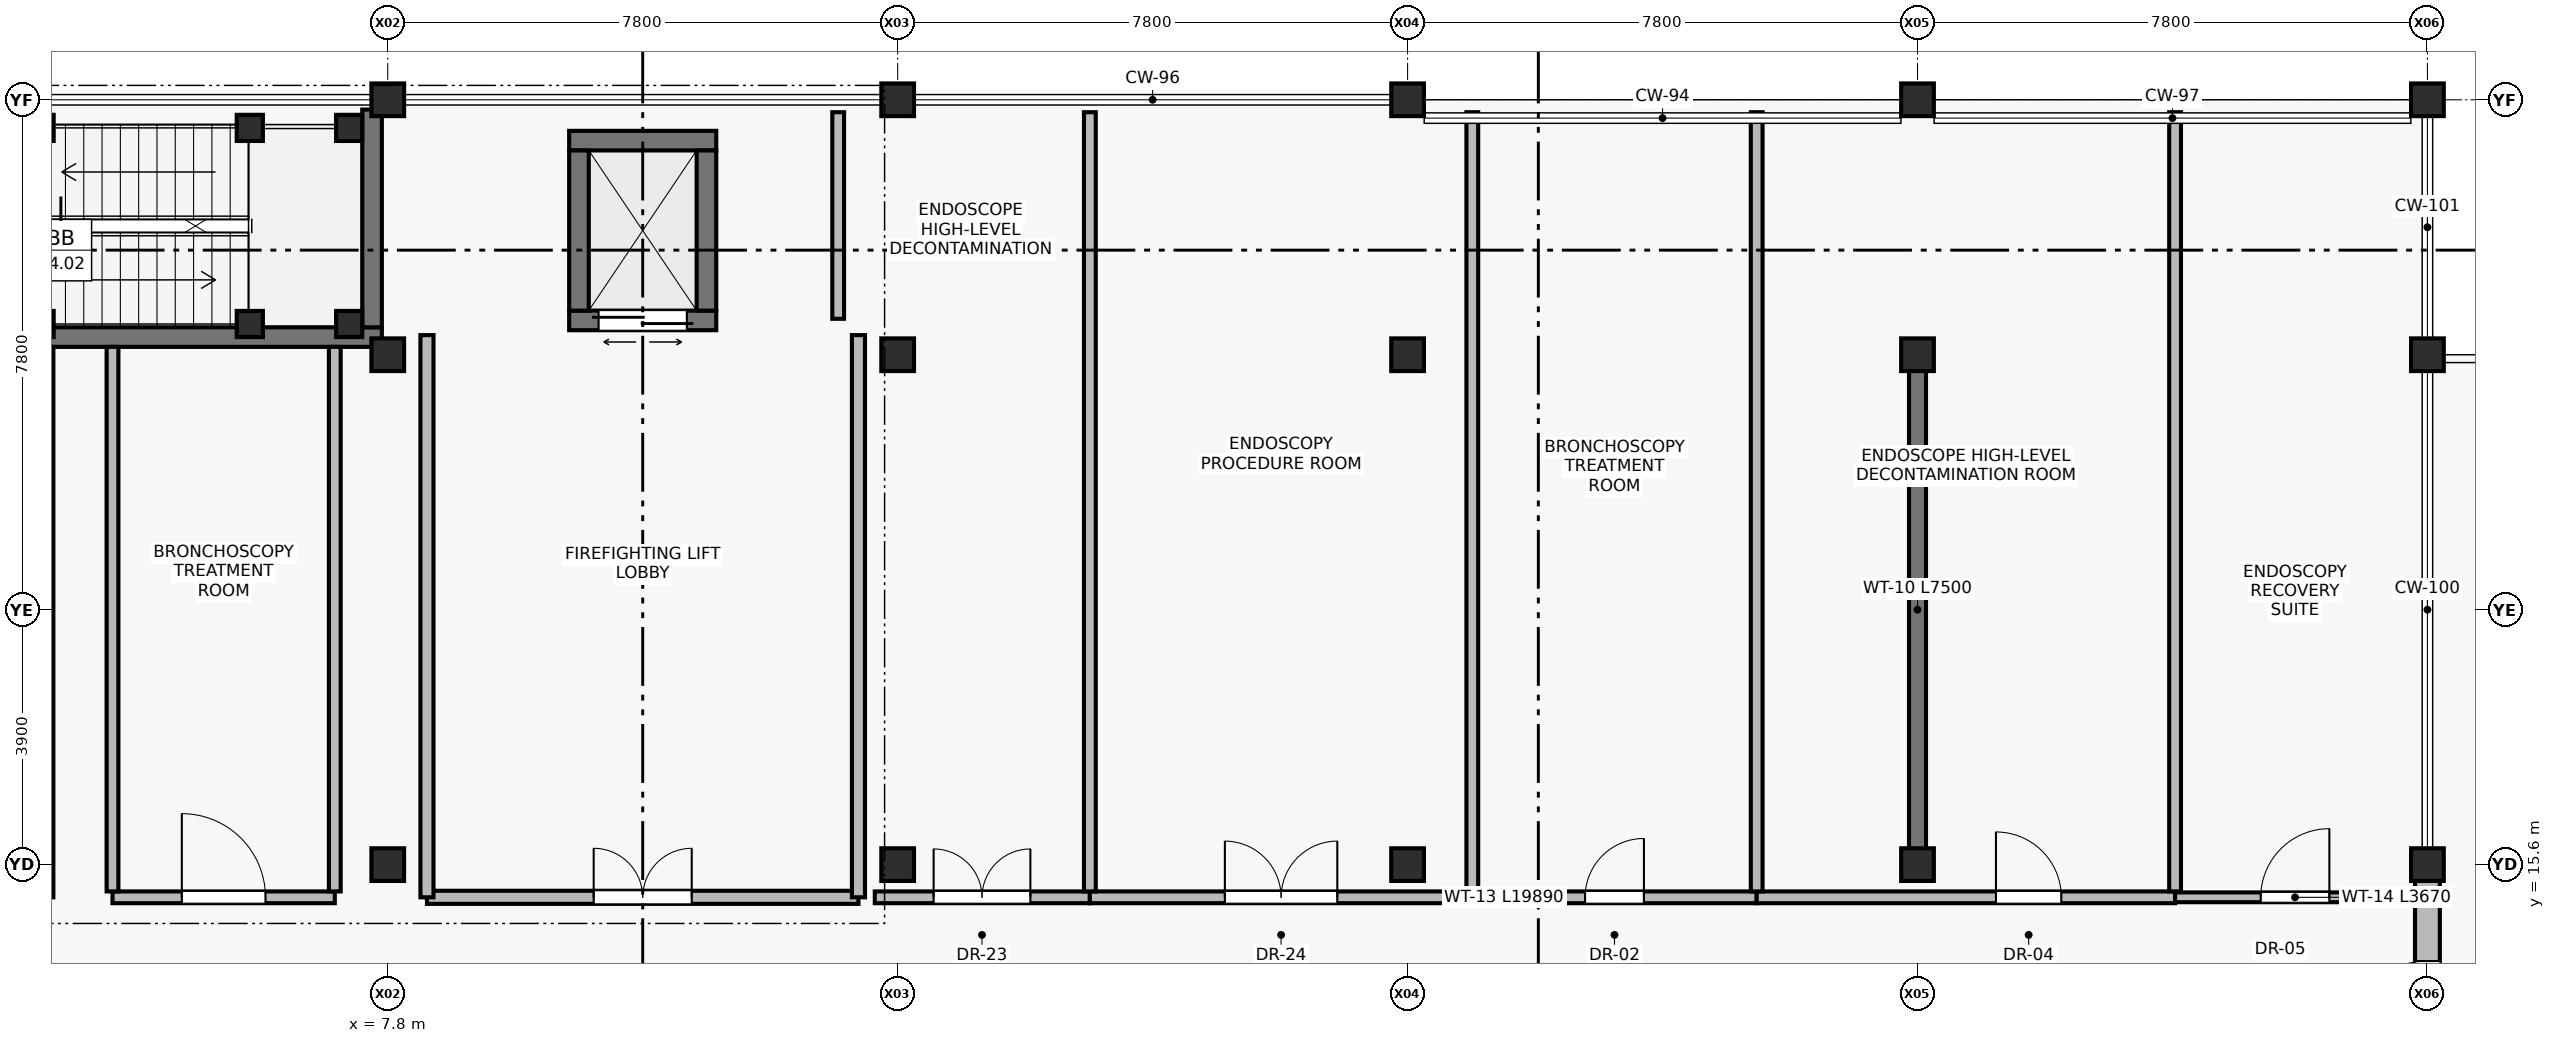
"""IFC4 building model, lengths in metres.
Left out: names, types, materials, properties, quantities, classifications, styles, units other than length and angle.
Written with IfcOpenShell. Run it as: python <this file> out.ifc"""

import sys

from ifc_helpers import new_model, si_unit, direction, frame, frame_2d, origin, origin_2d, place, context, subcontext, project, spatial, rectangle, extrude, element, fill, save


model = new_model("IFC4")
c1 = context("Model", 3, precision=1e-05, world=origin(), true_north=direction((0.0, 1.0)))
c2 = subcontext(c1, "Body", "Model", "MODEL_VIEW")
j1 = project(units=[si_unit("LENGTHUNIT", "METRE"), si_unit("PLANEANGLEUNIT", "RADIAN")], contexts=[c1])
p1 = place(None, origin())
s1 = spatial("IfcSite", under=j1, at=p1, CompositionType="ELEMENT")
p2 = place(p1, origin())
s2 = spatial("IfcBuilding", under=s1, at=p2, CompositionType="ELEMENT")
p3 = place(p2, frame((0.0, 0.0, 14.1)))
s3 = spatial("IfcBuildingStorey", under=s2, at=p3, CompositionType="ELEMENT", Elevation=14.1)
for number, where, z_axis, x_axis in (
    (1, (7.8, 15.6, 0.0), (0.0, 0.0, 1.0), (1.0, 0.0, 0.0)),
    (2, (7.8, 23.4, 0.0), (0.0, 0.0, 1.0), (1.0, 0.0, 0.0)),
    (3, (7.8, 27.3, 0.0), (0.0, 0.0, 1.0), (1.0, 0.0, 0.0)),
    (4, (15.6, 15.6, 0.0), (0.0, 0.0, 1.0), (1.0, 0.0, 0.0)),
    (5, (15.6, 23.4, 0.0), (0.0, 0.0, 1.0), (1.0, 0.0, 0.0)),
    (6, (15.6, 27.3, 0.0), (0.0, 0.0, 1.0), (1.0, 0.0, 0.0)),
    (7, (23.4, 15.6, 0.0), (0.0, 0.0, 1.0), (1.0, 0.0, 0.0)),
    (8, (23.4, 23.4, 0.0), (0.0, 0.0, 1.0), (1.0, 0.0, 0.0)),
    (9, (23.4, 27.3, 0.0), (0.0, 0.0, 1.0), (1.0, 0.0, 0.0)),
    (10, (31.2, 15.6, 0.0), (0.0, 0.0, 1.0), (1.0, 0.0, 0.0)),
    (11, (31.2, 23.4, 0.0), (0.0, 0.0, 1.0), (1.0, 0.0, 0.0)),
    (12, (31.2, 27.3, 0.0), (0.0, 0.0, 1.0), (1.0, 0.0, 0.0)),
    (13, (39.0, 15.6, 0.0), (0.0, 0.0, 1.0), (1.0, 0.0, 0.0)),
    (14, (39.0, 23.4, 0.0), (0.0, 0.0, 1.0), (1.0, 0.0, 0.0)),
    (15, (39.0, 27.3, 0.0), (0.0, 0.0, 1.0), (1.0, 0.0, 0.0)),
):
    element("IfcColumn", number, at=place(p3, frame(where, z_axis=z_axis, x_axis=x_axis)), inside=s3, PredefinedType="COLUMN", context=c2, shape_type="SweptSolid", body=[
        extrude(rectangle(XDim=0.5, YDim=0.5, at=origin_2d()), origin(), (0.0, 0.0, 1.0), 4.5),
    ])
for number, where, z_axis, x_axis in (
    (16, (2.49, 23.87, 0.0), (0.0, 0.0, 1.0), (1.0, 0.0, 0.0)),
    (17, (2.49, 26.87, 0.0), (0.0, 0.0, 1.0), (1.0, 0.0, 0.0)),
    (18, (5.69, 23.87, 0.0), (0.0, 0.0, 1.0), (1.0, 0.0, 0.0)),
    (19, (5.69, 26.87, 0.0), (0.0, 0.0, 1.0), (1.0, 0.0, 0.0)),
    (20, (7.21, 23.87, 0.0), (0.0, 0.0, 1.0), (1.0, 0.0, 0.0)),
    (21, (7.21, 26.87, 0.0), (0.0, 0.0, 1.0), (1.0, 0.0, 0.0)),
):
    element("IfcColumn", number, at=place(p3, frame(where, z_axis=z_axis, x_axis=x_axis)), inside=s3, PredefinedType="COLUMN", context=c2, shape_type="SweptSolid", body=[
        extrude(rectangle(XDim=0.4, YDim=0.4, at=origin_2d()), origin(), (0.0, 0.0, 1.0), 4.5),
    ])
p4 = place(p3, frame((39.0, 15.35, 0.0), z_axis=(0.0, 0.0, 1.0), x_axis=(0.0, -1.0, 0.0)))
e22 = element("IfcWall", 22, at=p4, inside=s3, PredefinedType="STANDARD", context=c2, shape_type="SweptSolid", body=[
    extrude(rectangle(XDim=7.3, YDim=0.38, at=frame_2d((3.65, 0.0))), origin(), (0.0, 0.0, 1.0), 3.84),
])
p5 = place(p4, frame((1.225, 0.0, 0.0)))
e23 = element("IfcOpeningElement", 23, at=p5, cuts=e22, PredefinedType="OPENING", context=c2, shape_type="SweptSolid", body=[
    extrude(rectangle(XDim=1.25, YDim=2.2, at=frame_2d((0.625, 1.1))), frame((0.0, 0.2, 0.0), z_axis=(0.0, -1.0, 0.0), x_axis=(1.0, 0.0, 0.0)), (0.0, 0.0, 1.0), 0.4),
])
p6 = place(p3, frame((0.15, 23.67, 0.0), z_axis=(0.0, 0.0, 1.0), x_axis=(1.0, 0.0, 0.0)))
e24 = element("IfcWall", 24, at=p6, inside=s3, PredefinedType="SHEAR", context=c2, shape_type="SweptSolid", body=[
    extrude(rectangle(XDim=7.56, YDim=0.3, at=frame_2d((3.78, 0.0))), origin(), (0.0, 0.0, 1.0), 4.26),
])
p7 = place(p6, frame((0.56, 0.0, 0.0)))
e25 = element("IfcOpeningElement", 25, at=p7, cuts=e24, PredefinedType="OPENING", context=c2, shape_type="SweptSolid", body=[
    extrude(rectangle(XDim=1.4, YDim=2.2, at=frame_2d((0.7, 1.1))), frame((0.0, 0.16, 0.0), z_axis=(0.0, -1.0, 0.0), x_axis=(1.0, 0.0, 0.0)), (0.0, 0.0, 1.0), 0.32),
])
p8 = place(p3, frame((7.56, 23.82, 0.0), z_axis=(0.0, 0.0, 1.0), x_axis=(0.0, 1.0, 0.0)))
e26 = element("IfcWall", 26, at=p8, inside=s3, PredefinedType="SHEAR", context=c2, shape_type="SweptSolid", body=[
    extrude(rectangle(XDim=3.33, YDim=0.3, at=frame_2d((1.665, 0.0))), origin(), (0.0, 0.0, 1.0), 4.26),
])
p9 = place(p3, frame((10.575, 23.925, 0.0), z_axis=(0.0, 0.0, 1.0), x_axis=(1.0, 0.0, 0.0)))
e27 = element("IfcWall", 27, at=p9, inside=s3, PredefinedType="SHEAR", context=c2, shape_type="SweptSolid", body=[
    extrude(rectangle(XDim=2.25, YDim=0.3, at=frame_2d((1.125, 0.0))), origin(), (0.0, 0.0, 1.0), 4.26),
])
p10 = place(p9, frame((0.45, 0.0, 0.0)))
e28 = element("IfcOpeningElement", 28, at=p10, cuts=e27, PredefinedType="OPENING", context=c2, shape_type="SweptSolid", body=[
    extrude(rectangle(XDim=1.35, YDim=2.3, at=frame_2d((0.675, 1.15))), frame((0.0, 0.16, 0.0), z_axis=(0.0, -1.0, 0.0), x_axis=(1.0, 0.0, 0.0)), (0.0, 0.0, 1.0), 0.32),
])
p11 = place(p3, frame((12.825, 26.675, 0.0), z_axis=(0.0, 0.0, 1.0), x_axis=(-1.0, 0.0, 0.0)))
e29 = element("IfcWall", 29, at=p11, inside=s3, PredefinedType="SHEAR", context=c2, shape_type="SweptSolid", body=[
    extrude(rectangle(XDim=2.25, YDim=0.3, at=frame_2d((1.125, 0.0))), origin(), (0.0, 0.0, 1.0), 4.26),
])
for number, where, z_axis, x_axis in (
    (30, (10.725, 26.525, 0.0), (0.0, 0.0, 1.0), (0.0, -1.0, 0.0)),
    (31, (12.675, 24.075, 0.0), (0.0, 0.0, 1.0), (0.0, 1.0, 0.0)),
):
    element("IfcWall", number, at=place(p3, frame(where, z_axis=z_axis, x_axis=x_axis)), inside=s3, PredefinedType="SHEAR", context=c2, shape_type="SweptSolid", body=[
        extrude(rectangle(XDim=2.45, YDim=0.3, at=frame_2d((1.225, 0.0))), origin(), (0.0, 0.0, 1.0), 4.26),
    ])
p12 = place(p3, frame((8.4, 15.1, 0.0), z_axis=(0.0, 0.0, 1.0), x_axis=(1.0, 0.0, 0.0)))
e32 = element("IfcWall", 32, at=p12, inside=s3, PredefinedType="SOLIDWALL", context=c2, shape_type="SweptSolid", body=[
    extrude(rectangle(XDim=6.6, YDim=0.2, at=frame_2d((3.3, 0.0))), origin(), (0.0, 0.0, 1.0), 4.26),
])
p13 = place(p12, frame((2.55, 0.0, 0.0)))
e33 = element("IfcOpeningElement", 33, at=p13, cuts=e32, PredefinedType="OPENING", context=c2, shape_type="SweptSolid", body=[
    extrude(rectangle(XDim=1.5, YDim=2.2, at=frame_2d((0.75, 1.1))), frame((0.0, 0.11, 0.0), z_axis=(0.0, -1.0, 0.0), x_axis=(1.0, 0.0, 0.0)), (0.0, 0.0, 1.0), 0.22),
])
for number, where, z_axis, x_axis in (
    (34, (8.4, 23.7, 0.0), (0.0, 0.0, 1.0), (0.0, -1.0, 0.0)),
    (35, (15.0, 15.1, 0.0), (0.0, 0.0, 1.0), (0.0, 1.0, 0.0)),
):
    element("IfcWall", number, at=place(p3, frame(where, z_axis=z_axis, x_axis=x_axis)), inside=s3, PredefinedType="SOLIDWALL", context=c2, shape_type="SweptSolid", body=[
        extrude(rectangle(XDim=8.6, YDim=0.2, at=frame_2d((4.3, 0.0))), origin(), (0.0, 0.0, 1.0), 4.26),
    ])
p14 = place(p3, frame((31.2, 15.75, 0.0), z_axis=(0.0, 0.0, 1.0), x_axis=(0.0, 1.0, 0.0)))
e36 = element("IfcWall", 36, at=p14, inside=s3, PredefinedType="SHEAR", context=c2, shape_type="SweptSolid", body=[
    extrude(rectangle(XDim=7.5, YDim=0.26, at=frame_2d((3.75, 0.0))), origin(), (0.0, 0.0, 1.0), 4.26),
])
p15 = place(p3, frame((2.61, 15.1, 0.0), z_axis=(0.0, 0.0, 1.0), x_axis=(0.0, 1.0, 0.0)))
e37 = element("IfcWall", 37, at=p15, inside=s3, PredefinedType="PARTITIONING", context=c2, shape_type="SweptSolid", body=[
    extrude(rectangle(XDim=8.42, YDim=0.15, at=frame_2d((4.21, 0.0))), origin(), (0.0, 0.0, 1.0), 3.95),
])
p16 = place(p3, frame((3.59, 15.1, 0.0), z_axis=(0.0, 0.0, 1.0), x_axis=(1.0, 0.0, 0.0)))
e38 = element("IfcWall", 38, at=p16, inside=s3, PredefinedType="PARTITIONING", context=c2, shape_type="SweptSolid", body=[
    extrude(rectangle(XDim=3.4, YDim=0.18, at=frame_2d((1.7, 0.0))), origin(), (0.0, 0.0, 1.0), 4.26),
])
p17 = place(p16, frame((1.06, 0.0, 0.0)))
e39 = element("IfcOpeningElement", 39, at=p17, cuts=e38, PredefinedType="OPENING", context=c2, shape_type="SweptSolid", body=[
    extrude(rectangle(XDim=1.28, YDim=2.25, at=frame_2d((0.64, 1.125))), frame((0.0, 0.1, 0.0), z_axis=(0.0, -1.0, 0.0), x_axis=(1.0, 0.0, 0.0)), (0.0, 0.0, 1.0), 0.2),
])
p18 = place(p3, frame((15.25, 15.1, 0.0), z_axis=(0.0, 0.0, 1.0), x_axis=(1.0, 0.0, 0.0)))
e40 = element("IfcWall", 40, at=p18, inside=s3, PredefinedType="PARTITIONING", context=c2, shape_type="SweptSolid", body=[
    extrude(rectangle(XDim=3.29, YDim=0.18, at=frame_2d((1.645, 0.0))), origin(), (0.0, 0.0, 1.0), 4.26),
])
p19 = place(p18, frame((0.9, 0.0, 0.0)))
e41 = element("IfcOpeningElement", 41, at=p19, cuts=e40, PredefinedType="OPENING", context=c2, shape_type="SweptSolid", body=[
    extrude(rectangle(XDim=1.48, YDim=2.25, at=frame_2d((0.74, 1.125))), frame((0.0, 0.1, 0.0), z_axis=(0.0, -1.0, 0.0), x_axis=(1.0, 0.0, 0.0)), (0.0, 0.0, 1.0), 0.2),
])
p20 = place(p3, frame((18.54, 15.1, 0.0), z_axis=(0.0, 0.0, 1.0), x_axis=(1.0, 0.0, 0.0)))
e42 = element("IfcWall", 42, at=p20, inside=s3, PredefinedType="PARTITIONING", context=c2, shape_type="SweptSolid", body=[
    extrude(rectangle(XDim=5.85, YDim=0.18, at=frame_2d((2.925, 0.0))), origin(), (0.0, 0.0, 1.0), 4.26),
])
p21 = place(p20, frame((2.065, 0.0, 0.0)))
e43 = element("IfcOpeningElement", 43, at=p21, cuts=e42, PredefinedType="OPENING", context=c2, shape_type="SweptSolid", body=[
    extrude(rectangle(XDim=1.72, YDim=2.3, at=frame_2d((0.86, 1.15))), frame((0.0, 0.1, 0.0), z_axis=(0.0, -1.0, 0.0), x_axis=(1.0, 0.0, 0.0)), (0.0, 0.0, 1.0), 0.2),
])
p22 = place(p3, frame((24.39, 15.1, 0.0), z_axis=(0.0, 0.0, 1.0), x_axis=(1.0, 0.0, 0.0)))
e44 = element("IfcWall", 44, at=p22, inside=s3, PredefinedType="PARTITIONING", context=c2, shape_type="SweptSolid", body=[
    extrude(rectangle(XDim=4.35, YDim=0.18, at=frame_2d((2.175, 0.0))), origin(), (0.0, 0.0, 1.0), 4.26),
])
p23 = place(p22, frame((1.725, 0.0, 0.0)))
e45 = element("IfcOpeningElement", 45, at=p23, cuts=e44, PredefinedType="OPENING", context=c2, shape_type="SweptSolid", body=[
    extrude(rectangle(XDim=0.9, YDim=2.1, at=frame_2d((0.45, 1.05))), frame((0.0, 0.1, 0.0), z_axis=(0.0, -1.0, 0.0), x_axis=(1.0, 0.0, 0.0)), (0.0, 0.0, 1.0), 0.2),
])
p24 = place(p3, frame((28.74, 15.1, 0.0), z_axis=(0.0, 0.0, 1.0), x_axis=(1.0, 0.0, 0.0)))
e46 = element("IfcWall", 46, at=p24, inside=s3, PredefinedType="PARTITIONING", context=c2, shape_type="SweptSolid", body=[
    extrude(rectangle(XDim=6.4, YDim=0.18, at=frame_2d((3.2, 0.0))), origin(), (0.0, 0.0, 1.0), 4.26),
])
p25 = place(p24, frame((3.66, 0.0, 0.0)))
e47 = element("IfcOpeningElement", 47, at=p25, cuts=e46, PredefinedType="OPENING", context=c2, shape_type="SweptSolid", body=[
    extrude(rectangle(XDim=1.0, YDim=2.1, at=frame_2d((0.5, 1.05))), frame((0.0, 0.1, 0.0), z_axis=(0.0, -1.0, 0.0), x_axis=(1.0, 0.0, 0.0)), (0.0, 0.0, 1.0), 0.2),
])
p26 = place(p3, frame((35.14, 15.1, 0.0), z_axis=(0.0, 0.0, 1.0), x_axis=(1.0, 0.0, 0.0)))
e48 = element("IfcWall", 48, at=p26, inside=s3, PredefinedType="PARTITIONING", context=c2, shape_type="SweptSolid", body=[
    extrude(rectangle(XDim=3.67, YDim=0.15, at=frame_2d((1.835, 0.0))), origin(), (0.0, 0.0, 1.0), 4.26),
])
p27 = place(p26, frame((1.31, 0.0, 0.0)))
e49 = element("IfcOpeningElement", 49, at=p27, cuts=e48, PredefinedType="OPENING", context=c2, shape_type="SweptSolid", body=[
    extrude(rectangle(XDim=1.05, YDim=2.15, at=frame_2d((0.525, 1.075))), frame((0.0, 0.085, 0.0), z_axis=(0.0, -1.0, 0.0), x_axis=(1.0, 0.0, 0.0)), (0.0, 0.0, 1.0), 0.17),
])
for number, where, z_axis, x_axis in (
    (50, (3.59, 15.19, 0.0), (0.0, 0.0, 1.0), (0.0, 1.0, 0.0)),
    (51, (6.99, 15.19, 0.0), (0.0, 0.0, 1.0), (0.0, 1.0, 0.0)),
):
    element("IfcWall", number, at=place(p3, frame(where, z_axis=z_axis, x_axis=x_axis)), inside=s3, PredefinedType="PARTITIONING", context=c2, shape_type="SweptSolid", body=[
        extrude(rectangle(XDim=8.33, YDim=0.18, at=frame_2d((4.165, 0.0))), origin(), (0.0, 0.0, 1.0), 4.26),
    ])
p28 = place(p3, frame((14.69, 23.95, 0.0), z_axis=(0.0, 0.0, 1.0), x_axis=(0.0, 1.0, 0.0)))
e52 = element("IfcWall", 52, at=p28, inside=s3, PredefinedType="PARTITIONING", context=c2, shape_type="SweptSolid", body=[
    extrude(rectangle(XDim=3.16, YDim=0.18, at=frame_2d((1.58, 0.0))), origin(), (0.0, 0.0, 1.0), 4.26),
])
p29 = place(p3, frame((18.54, 15.19, 0.0), z_axis=(0.0, 0.0, 1.0), x_axis=(0.0, 1.0, 0.0)))
e53 = element("IfcWall", 53, at=p29, inside=s3, PredefinedType="PARTITIONING", context=c2, shape_type="SweptSolid", body=[
    extrude(rectangle(XDim=11.92, YDim=0.18, at=frame_2d((5.96, 0.0))), origin(), (0.0, 0.0, 1.0), 3.95),
])
p30 = place(p3, frame((24.39, 15.19, 0.0), z_axis=(0.0, 0.0, 1.0), x_axis=(0.0, 1.0, 0.0)))
e54 = element("IfcWall", 54, at=p30, inside=s3, PredefinedType="PARTITIONING", context=c2, shape_type="SweptSolid", body=[
    extrude(rectangle(XDim=11.92, YDim=0.18, at=frame_2d((5.96, 0.0))), origin(), (0.0, 0.0, 1.0), 4.26),
])
p31 = place(p3, frame((28.74, 15.19, 0.0), z_axis=(0.0, 0.0, 1.0), x_axis=(0.0, 1.0, 0.0)))
e55 = element("IfcWall", 55, at=p31, inside=s3, PredefinedType="PARTITIONING", context=c2, shape_type="SweptSolid", body=[
    extrude(rectangle(XDim=11.92, YDim=0.18, at=frame_2d((5.96, 0.0))), origin(), (0.0, 0.0, 1.0), 3.95),
])
p32 = place(p3, frame((35.14, 15.19, 0.0), z_axis=(0.0, 0.0, 1.0), x_axis=(0.0, 1.0, 0.0)))
e56 = element("IfcWall", 56, at=p32, inside=s3, PredefinedType="PARTITIONING", context=c2, shape_type="SweptSolid", body=[
    extrude(rectangle(XDim=11.92, YDim=0.18, at=frame_2d((5.96, 0.0))), origin(), (0.0, 0.0, 1.0), 4.26),
])
p33 = place(p5, frame((1.25, 0.0, 0.0), z_axis=(0.0, 0.0, 1.0), x_axis=(-1.0, 0.0, 0.0)))
e57 = element("IfcDoor", 57, at=p33, inside=s3, OperationType="SINGLE_SWING_RIGHT", PredefinedType="DOOR", context=c2, shape_type="SweptSolid", body=[
    extrude(rectangle(XDim=1.25, YDim=2.2, at=frame_2d((0.625, 1.1))), frame((0.0, 0.025, 0.0), z_axis=(0.0, -1.0, 0.0), x_axis=(1.0, 0.0, 0.0)), (0.0, 0.0, 1.0), 0.05),
])
fill(e23, e57)
p34 = place(p10, origin())
e58 = element("IfcDoor", 58, at=p34, inside=s3, OperationType="DOUBLE_DOOR_SLIDING", PredefinedType="DOOR", context=c2, shape_type="SweptSolid", body=[
    extrude(rectangle(XDim=1.35, YDim=2.3, at=frame_2d((0.675, 1.15))), frame((0.0, 0.025, 0.0), z_axis=(0.0, -1.0, 0.0), x_axis=(1.0, 0.0, 0.0)), (0.0, 0.0, 1.0), 0.05),
])
fill(e28, e58)
p35 = place(p13, origin())
e59 = element("IfcDoor", 59, at=p35, inside=s3, OperationType="DOUBLE_DOOR_SINGLE_SWING", PredefinedType="DOOR", context=c2, shape_type="SweptSolid", body=[
    extrude(rectangle(XDim=1.5, YDim=2.2, at=frame_2d((0.75, 1.1))), frame((0.0, 0.025, 0.0), z_axis=(0.0, -1.0, 0.0), x_axis=(1.0, 0.0, 0.0)), (0.0, 0.0, 1.0), 0.05),
])
fill(e33, e59)
p36 = place(p17, origin())
e60 = element("IfcDoor", 60, at=p36, inside=s3, OperationType="SINGLE_SWING_LEFT", PredefinedType="DOOR", context=c2, shape_type="SweptSolid", body=[
    extrude(rectangle(XDim=1.28, YDim=2.25, at=frame_2d((0.64, 1.125))), frame((0.0, 0.025, 0.0), z_axis=(0.0, -1.0, 0.0), x_axis=(1.0, 0.0, 0.0)), (0.0, 0.0, 1.0), 0.05),
])
fill(e39, e60)
p37 = place(p19, origin())
e61 = element("IfcDoor", 61, at=p37, inside=s3, OperationType="DOUBLE_DOOR_SINGLE_SWING", PredefinedType="DOOR", context=c2, shape_type="SweptSolid", body=[
    extrude(rectangle(XDim=1.48, YDim=2.25, at=frame_2d((0.74, 1.125))), frame((0.0, 0.025, 0.0), z_axis=(0.0, -1.0, 0.0), x_axis=(1.0, 0.0, 0.0)), (0.0, 0.0, 1.0), 0.05),
])
fill(e41, e61)
p38 = place(p21, origin())
e62 = element("IfcDoor", 62, at=p38, inside=s3, OperationType="DOUBLE_DOOR_SINGLE_SWING", PredefinedType="DOOR", context=c2, shape_type="SweptSolid", body=[
    extrude(rectangle(XDim=1.72, YDim=2.3, at=frame_2d((0.86, 1.15))), frame((0.0, 0.025, 0.0), z_axis=(0.0, -1.0, 0.0), x_axis=(1.0, 0.0, 0.0)), (0.0, 0.0, 1.0), 0.05),
])
fill(e43, e62)
p39 = place(p23, origin())
e63 = element("IfcDoor", 63, at=p39, inside=s3, OperationType="SINGLE_SWING_RIGHT", PredefinedType="DOOR", context=c2, shape_type="SweptSolid", body=[
    extrude(rectangle(XDim=0.9, YDim=2.1, at=frame_2d((0.45, 1.05))), frame((0.0, 0.025, 0.0), z_axis=(0.0, -1.0, 0.0), x_axis=(1.0, 0.0, 0.0)), (0.0, 0.0, 1.0), 0.05),
])
fill(e45, e63)
p40 = place(p25, origin())
e64 = element("IfcDoor", 64, at=p40, inside=s3, OperationType="SINGLE_SWING_LEFT", PredefinedType="DOOR", context=c2, shape_type="SweptSolid", body=[
    extrude(rectangle(XDim=1.0, YDim=2.1, at=frame_2d((0.5, 1.05))), frame((0.0, 0.025, 0.0), z_axis=(0.0, -1.0, 0.0), x_axis=(1.0, 0.0, 0.0)), (0.0, 0.0, 1.0), 0.05),
])
fill(e47, e64)
p41 = place(p27, origin())
e65 = element("IfcDoor", 65, at=p41, inside=s3, OperationType="SINGLE_SWING_RIGHT", PredefinedType="DOOR", context=c2, shape_type="SweptSolid", body=[
    extrude(rectangle(XDim=1.05, YDim=2.15, at=frame_2d((0.525, 1.075))), frame((0.0, 0.025, 0.0), z_axis=(0.0, -1.0, 0.0), x_axis=(1.0, 0.0, 0.0)), (0.0, 0.0, 1.0), 0.05),
])
fill(e49, e65)
save(model, sys.argv[1])
